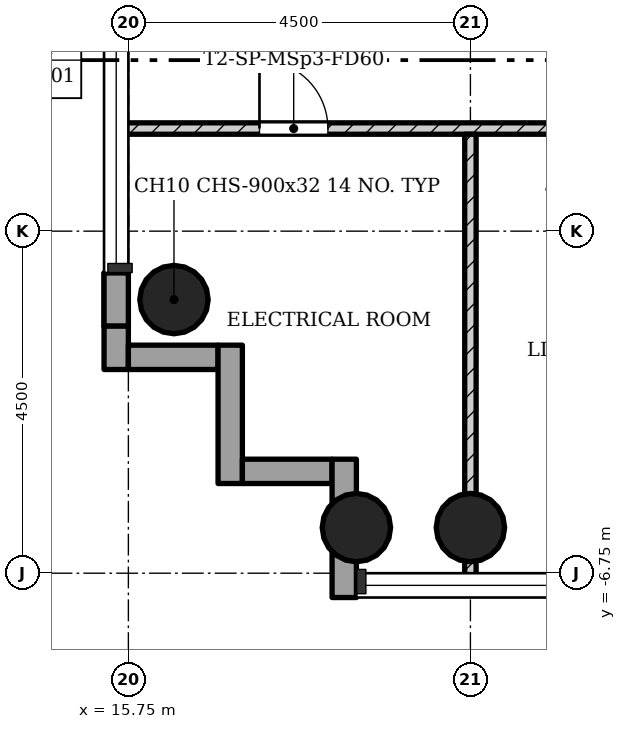
"""IFC4 building model, lengths in metres.
Left out: names, types, materials, properties, quantities, classifications, styles, units other than length and angle.
Written with IfcOpenShell. Run it as: python <this file> out.ifc"""

import sys

from ifc_helpers import new_model, si_unit, direction, frame, frame_2d, origin, origin_2d, place, context, subcontext, project, spatial, rectangle, hollow_circle, extrude, element, fill, save


model = new_model("IFC4")
c1 = context("Model", 3, precision=1e-05, world=origin(), true_north=direction((0.0, 1.0)))
c2 = subcontext(c1, "Body", "Model", "MODEL_VIEW")
j1 = project(units=[si_unit("LENGTHUNIT", "METRE"), si_unit("PLANEANGLEUNIT", "RADIAN")], contexts=[c1])
p1 = place(None, origin())
s1 = spatial("IfcSite", under=j1, at=p1, CompositionType="ELEMENT")
p2 = place(p1, origin())
s2 = spatial("IfcBuilding", under=s1, at=p2, CompositionType="ELEMENT")
p3 = place(p2, frame((0.0, 0.0, 124.2)))
s3 = spatial("IfcBuildingStorey", under=s2, at=p3, CompositionType="ELEMENT", Elevation=124.2)
for number, where, z_axis, x_axis in (
    (1, (20.25, -6.15, 0.0), (0.0, 0.0, 1.0), (1.0, 0.0, 0.0)),
    (2, (18.75, -6.15, 0.0), (0.0, 0.0, 1.0), (1.0, 0.0, 0.0)),
    (3, (16.35, -3.15, 0.0), (0.0, 0.0, 1.0), (1.0, 0.0, 0.0)),
):
    element("IfcColumn", number, at=place(p3, frame(where, z_axis=z_axis, x_axis=x_axis)), inside=s3, PredefinedType="COLUMN", context=c2, shape_type="SweptSolid", body=[
        extrude(hollow_circle(Radius=0.45, WallThickness=0.032, at=origin_2d()), origin(), (0.0, 0.0, 1.0), 4.5),
    ])
p4 = place(p3, frame((15.59, -2.8, 0.0), z_axis=(0.0, 0.0, 1.0), x_axis=(0.0, -1.0, 0.0)))
e4 = element("IfcWall", 4, at=p4, inside=s3, PredefinedType="STANDARD", context=c2, shape_type="SweptSolid", body=[
    extrude(rectangle(XDim=0.7, YDim=0.32, at=frame_2d((0.35, 0.0))), origin(), (0.0, 0.0, 1.0), 3.61),
])
p5 = place(p3, frame((15.59, -2.8, 4.08), z_axis=(0.0, 0.0, 1.0), x_axis=(0.0, -1.0, 0.0)))
e5 = element("IfcWall", 5, at=p5, inside=s3, PredefinedType="STANDARD", context=c2, shape_type="SweptSolid", body=[
    extrude(rectangle(XDim=0.7, YDim=0.32, at=frame_2d((0.35, 0.0))), origin(), (0.0, 0.0, 1.0), 0.12),
])
p6 = place(p3, frame((15.59, -3.5, 0.0), z_axis=(0.0, 0.0, 1.0), x_axis=(0.0, -1.0, 0.0)))
e6 = element("IfcWall", 6, at=p6, inside=s3, PredefinedType="STANDARD", context=c2, shape_type="SweptSolid", body=[
    extrude(rectangle(XDim=0.57, YDim=0.32, at=frame_2d((0.285, 0.0))), origin(), (0.0, 0.0, 1.0), 4.2),
])
p7 = place(p3, frame((15.75, -3.91, -0.3), z_axis=(0.0, 0.0, 1.0), x_axis=(1.0, 0.0, 0.0)))
e7 = element("IfcWall", 7, at=p7, inside=s3, PredefinedType="STANDARD", context=c2, shape_type="SweptSolid", body=[
    extrude(rectangle(XDim=1.18, YDim=0.32, at=frame_2d((0.59, 0.0))), origin(), (0.0, 0.0, 1.0), 4.5),
])
p8 = place(p3, frame((17.09, -3.75, -0.3), z_axis=(0.0, 0.0, 1.0), x_axis=(0.0, -1.0, 0.0)))
e8 = element("IfcWall", 8, at=p8, inside=s3, PredefinedType="STANDARD", context=c2, shape_type="SweptSolid", body=[
    extrude(rectangle(XDim=1.82, YDim=0.32, at=frame_2d((0.91, 0.0))), origin(), (0.0, 0.0, 1.0), 4.5),
])
p9 = place(p3, frame((17.25, -5.41, -0.3), z_axis=(0.0, 0.0, 1.0), x_axis=(1.0, 0.0, 0.0)))
e9 = element("IfcWall", 9, at=p9, inside=s3, PredefinedType="STANDARD", context=c2, shape_type="SweptSolid", body=[
    extrude(rectangle(XDim=1.18, YDim=0.32, at=frame_2d((0.59, 0.0))), origin(), (0.0, 0.0, 1.0), 4.5),
])
p10 = place(p3, frame((18.59, -5.25, -0.3), z_axis=(0.0, 0.0, 1.0), x_axis=(0.0, -1.0, 0.0)))
e10 = element("IfcWall", 10, at=p10, inside=s3, PredefinedType="STANDARD", context=c2, shape_type="SweptSolid", body=[
    extrude(rectangle(XDim=1.82, YDim=0.32, at=frame_2d((0.91, 0.0))), origin(), (0.0, 0.0, 1.0), 4.5),
])
p11 = place(p3, frame((29.175, -0.9, 0.0), z_axis=(0.0, 0.0, 1.0), x_axis=(-1.0, 0.0, 0.0)))
e11 = element("IfcWall", 11, at=p11, inside=s3, PredefinedType="PARTITIONING", context=c2, shape_type="SweptSolid", body=[
    extrude(rectangle(XDim=13.525, YDim=0.15, at=frame_2d((6.763, 0.0))), origin(), (0.0, 0.0, 1.0), 4.1),
])
p12 = place(p11, frame((1.8, 0.0, 0.0)))
e12 = element("IfcOpeningElement", 12, at=p12, cuts=e11, PredefinedType="OPENING", context=c2, shape_type="SweptSolid", body=[
    extrude(rectangle(XDim=0.9, YDim=2.1, at=frame_2d((0.45, 1.05))), frame((0.0, 0.085, 0.0), z_axis=(0.0, -1.0, 0.0), x_axis=(1.0, 0.0, 0.0)), (0.0, 0.0, 1.0), 0.17),
])
p13 = place(p11, frame((6.3, 0.0, 0.0)))
e13 = element("IfcOpeningElement", 13, at=p13, cuts=e11, PredefinedType="OPENING", context=c2, shape_type="SweptSolid", body=[
    extrude(rectangle(XDim=0.9, YDim=2.1, at=frame_2d((0.45, 1.05))), frame((0.0, 0.085, 0.0), z_axis=(0.0, -1.0, 0.0), x_axis=(1.0, 0.0, 0.0)), (0.0, 0.0, 1.0), 0.17),
])
p14 = place(p11, frame((10.8, 0.0, 0.0)))
e14 = element("IfcOpeningElement", 14, at=p14, cuts=e11, PredefinedType="OPENING", context=c2, shape_type="SweptSolid", body=[
    extrude(rectangle(XDim=0.9, YDim=2.1, at=frame_2d((0.45, 1.05))), frame((0.0, 0.085, 0.0), z_axis=(0.0, -1.0, 0.0), x_axis=(1.0, 0.0, 0.0)), (0.0, 0.0, 1.0), 0.17),
])
p15 = place(p3, frame((20.25, -0.975, 0.0), z_axis=(0.0, 0.0, 1.0), x_axis=(0.0, -1.0, 0.0)))
e15 = element("IfcWall", 15, at=p15, inside=s3, PredefinedType="PARTITIONING", context=c2, shape_type="SweptSolid", body=[
    extrude(rectangle(XDim=5.875, YDim=0.15, at=frame_2d((2.938, 0.0))), origin(), (0.0, 0.0, 1.0), 4.1),
])
p16 = place(p14, origin())
e16 = element("IfcDoor", 16, at=p16, inside=s3, OperationType="SINGLE_SWING_RIGHT", PredefinedType="DOOR", context=c2, shape_type="SweptSolid", body=[
    extrude(rectangle(XDim=0.9, YDim=2.1, at=frame_2d((0.45, 1.05))), frame((0.0, 0.025, 0.0), z_axis=(0.0, -1.0, 0.0), x_axis=(1.0, 0.0, 0.0)), (0.0, 0.0, 1.0), 0.05),
])
fill(e14, e16)
save(model, sys.argv[1])
